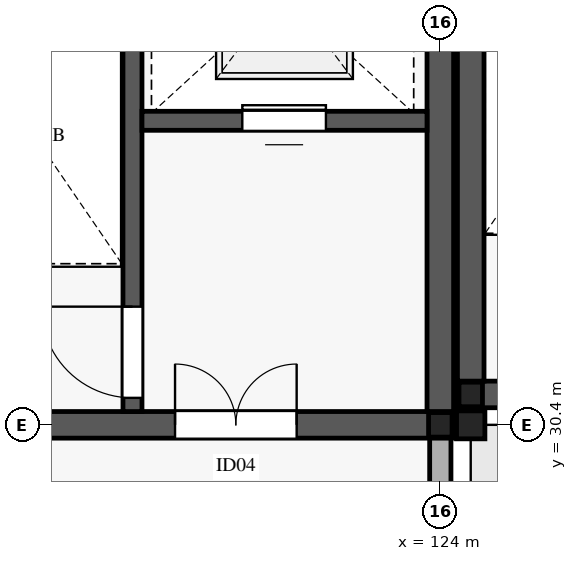
"""IFC4 building model, lengths in metres.
Left out: names, types, materials, properties, quantities, classifications, styles, units other than length and angle.
Written with IfcOpenShell. Run it as: python <this file> out.ifc"""

import sys

from ifc_helpers import new_model, si_unit, direction, frame, frame_2d, origin, origin_2d, place, context, subcontext, project, spatial, rectangle, i_section, extrude, element, fill, save


model = new_model("IFC4")
c1 = context("Model", 3, precision=1e-05, world=origin(), true_north=direction((0.0, 1.0)))
c2 = subcontext(c1, "Body", "Model", "MODEL_VIEW")
j1 = project(units=[si_unit("LENGTHUNIT", "METRE"), si_unit("PLANEANGLEUNIT", "RADIAN")], contexts=[c1])
p1 = place(None, origin())
s1 = spatial("IfcSite", under=j1, at=p1, CompositionType="ELEMENT")
p2 = place(p1, origin())
s2 = spatial("IfcBuilding", under=s1, at=p2, CompositionType="ELEMENT")
p3 = place(p2, frame((0.0, 0.0, 20.4)))
s3 = spatial("IfcBuildingStorey", under=s2, at=p3, CompositionType="ELEMENT", Elevation=20.4)
p4 = place(p3, frame((124.4, 30.8, 0.0), z_axis=(0.0, 0.0, 1.0), x_axis=(1.0, 0.0, 0.0)))
e1 = element("IfcColumn", 1, at=p4, inside=s3, PredefinedType="COLUMN", context=c2, shape_type="SweptSolid", body=[
    extrude(i_section(OverallWidth=0.309, OverallDepth=0.323, WebThickness=0.014, FlangeThickness=0.023, FilletRadius=0.015, at=origin_2d()), origin(), (0.0, 0.0, 1.0), 4.545),
])
p5 = place(p3, frame((124.0, 30.4, 0.0), z_axis=(0.0, 0.0, 1.0), x_axis=(1.0, 0.0, 0.0)))
e2 = element("IfcColumn", 2, at=p5, inside=s3, PredefinedType="COLUMN", context=c2, shape_type="SweptSolid", body=[
    extrude(i_section(OverallWidth=0.309, OverallDepth=0.323, WebThickness=0.014, FlangeThickness=0.023, FilletRadius=0.015, at=origin_2d()), origin(), (0.0, 0.0, 1.0), 4.595),
])
p6 = place(p3, frame((124.4, 30.4, -0.195), z_axis=(0.0, 0.0, 1.0), x_axis=(1.0, 0.0, 0.0)))
e3 = element("IfcColumn", 3, at=p6, inside=s3, PredefinedType="COLUMN", context=c2, shape_type="SweptSolid", body=[
    extrude(i_section(OverallWidth=0.373, OverallDepth=0.368, WebThickness=0.015, FlangeThickness=0.024, FilletRadius=0.015, at=origin_2d()), origin(), (0.0, 0.0, 1.0), 0.68),
])
p7 = place(p3, frame((124.0, 30.42, 0.0), z_axis=(0.0, 0.0, 1.0), x_axis=(0.0, -1.0, 0.0)))
e4 = element("IfcWall", 4, at=p7, inside=s3, PredefinedType="STANDARD", context=c2, shape_type="SweptSolid", body=[
    extrude(rectangle(XDim=7.64, YDim=0.28, at=frame_2d((3.82, 0.0))), origin(), (0.0, 0.0, 1.0), 3.66),
])
p8 = place(p7, frame((2.495, 0.0, 0.75)))
e5 = element("IfcOpeningElement", 5, at=p8, cuts=e4, PredefinedType="OPENING", context=c2, shape_type="SweptSolid", body=[
    extrude(rectangle(XDim=2.65, YDim=1.8, at=frame_2d((1.325, 0.9))), frame((0.0, 0.15, 0.0), z_axis=(0.0, -1.0, 0.0), x_axis=(1.0, 0.0, 0.0)), (0.0, 0.0, 1.0), 0.3),
])
p9 = place(p3, frame((124.225, 30.8, 0.0), z_axis=(0.0, 0.0, 1.0), x_axis=(1.0, 0.0, 0.0)))
e6 = element("IfcWall", 6, at=p9, inside=s3, PredefinedType="SHEAR", context=c2, shape_type="SweptSolid", body=[
    extrude(rectangle(XDim=7.95, YDim=0.35, at=frame_2d((3.975, 0.0))), origin(), (0.0, 0.0, 1.0), 4.545),
])
p10 = place(p3, frame((124.4, 30.975, 0.0), z_axis=(0.0, 0.0, 1.0), x_axis=(0.0, 1.0, 0.0)))
e7 = element("IfcWall", 7, at=p10, inside=s3, PredefinedType="SHEAR", context=c2, shape_type="SweptSolid", body=[
    extrude(rectangle(XDim=6.85, YDim=0.35, at=frame_2d((3.425, 0.0))), origin(), (0.0, 0.0, 1.0), 4.545),
])
p11 = place(p3, frame((115.825, 30.4, 0.0), z_axis=(0.0, 0.0, 1.0), x_axis=(1.0, 0.0, 0.0)))
e8 = element("IfcWall", 8, at=p11, inside=s3, PredefinedType="SHEAR", context=c2, shape_type="SweptSolid", body=[
    extrude(rectangle(XDim=8.35, YDim=0.35, at=frame_2d((4.175, 0.0))), origin(), (0.0, 0.0, 1.0), 4.59),
])
p12 = place(p11, frame((4.685, 0.0, 0.0)))
e9 = element("IfcOpeningElement", 9, at=p12, cuts=e8, PredefinedType="OPENING", context=c2, shape_type="SweptSolid", body=[
    extrude(rectangle(XDim=1.6, YDim=2.35, at=frame_2d((0.8, 1.175))), frame((0.0, 0.185, 0.0), z_axis=(0.0, -1.0, 0.0), x_axis=(1.0, 0.0, 0.0)), (0.0, 0.0, 1.0), 0.37),
])
p13 = place(p3, frame((124.0, 30.575, 0.0), z_axis=(0.0, 0.0, 1.0), x_axis=(0.0, 1.0, 0.0)))
e10 = element("IfcWall", 10, at=p13, inside=s3, PredefinedType="SHEAR", context=c2, shape_type="SweptSolid", body=[
    extrude(rectangle(XDim=7.25, YDim=0.35, at=frame_2d((3.625, 0.0))), origin(), (0.0, 0.0, 1.0), 4.59),
])
p14 = place(p3, frame((119.95, 30.575, 0.0), z_axis=(0.0, 0.0, 1.0), x_axis=(0.0, 1.0, 0.0)))
e11 = element("IfcWall", 11, at=p14, inside=s3, PredefinedType="SHEAR", context=c2, shape_type="SweptSolid", body=[
    extrude(rectangle(XDim=7.25, YDim=0.25, at=frame_2d((3.625, 0.0))), origin(), (0.0, 0.0, 1.0), 4.59),
])
p15 = place(p14, frame((0.18, 0.0, 0.0)))
e12 = element("IfcOpeningElement", 12, at=p15, cuts=e11, PredefinedType="OPENING", context=c2, shape_type="SweptSolid", body=[
    extrude(rectangle(XDim=1.2, YDim=2.2, at=frame_2d((0.6, 1.1))), frame((0.0, 0.135, 0.0), z_axis=(0.0, -1.0, 0.0), x_axis=(1.0, 0.0, 0.0)), (0.0, 0.0, 1.0), 0.27),
])
p16 = place(p3, frame((120.075, 34.4, 0.0), z_axis=(0.0, 0.0, 1.0), x_axis=(1.0, 0.0, 0.0)))
e13 = element("IfcWall", 13, at=p16, inside=s3, PredefinedType="SHEAR", context=c2, shape_type="SweptSolid", body=[
    extrude(rectangle(XDim=3.75, YDim=0.25, at=frame_2d((1.875, 0.0))), origin(), (0.0, 0.0, 1.0), 4.59),
])
p17 = place(p16, frame((1.32, 0.0, 0.0)))
e14 = element("IfcOpeningElement", 14, at=p17, cuts=e13, PredefinedType="OPENING", context=c2, shape_type="SweptSolid", body=[
    extrude(rectangle(XDim=1.1, YDim=2.2, at=frame_2d((0.55, 1.1))), frame((0.0, 0.135, 0.0), z_axis=(0.0, -1.0, 0.0), x_axis=(1.0, 0.0, 0.0)), (0.0, 0.0, 1.0), 0.27),
])
p18 = place(p15, origin())
e15 = element("IfcDoor", 15, at=p18, inside=s3, OperationType="SINGLE_SWING_RIGHT", PredefinedType="DOOR", context=c2, shape_type="SweptSolid", body=[
    extrude(rectangle(XDim=1.2, YDim=2.2, at=frame_2d((0.6, 1.1))), frame((0.0, 0.025, 0.0), z_axis=(0.0, -1.0, 0.0), x_axis=(1.0, 0.0, 0.0)), (0.0, 0.0, 1.0), 0.05),
])
fill(e12, e15)
p19 = place(p12, origin())
e16 = element("IfcDoor", 16, at=p19, inside=s3, OperationType="DOUBLE_DOOR_SINGLE_SWING", PredefinedType="DOOR", context=c2, shape_type="SweptSolid", body=[
    extrude(rectangle(XDim=1.6, YDim=2.35, at=frame_2d((0.8, 1.175))), frame((0.0, 0.025, 0.0), z_axis=(0.0, -1.0, 0.0), x_axis=(1.0, 0.0, 0.0)), (0.0, 0.0, 1.0), 0.05),
])
fill(e9, e16)
p20 = place(p17, origin())
e17 = element("IfcDoor", 17, at=p20, inside=s3, OperationType="SLIDING_TO_LEFT", PredefinedType="DOOR", context=c2, shape_type="SweptSolid", body=[
    extrude(rectangle(XDim=1.1, YDim=2.2, at=frame_2d((0.55, 1.1))), frame((0.0, 0.025, 0.0), z_axis=(0.0, -1.0, 0.0), x_axis=(1.0, 0.0, 0.0)), (0.0, 0.0, 1.0), 0.05),
])
fill(e14, e17)
save(model, sys.argv[1])
